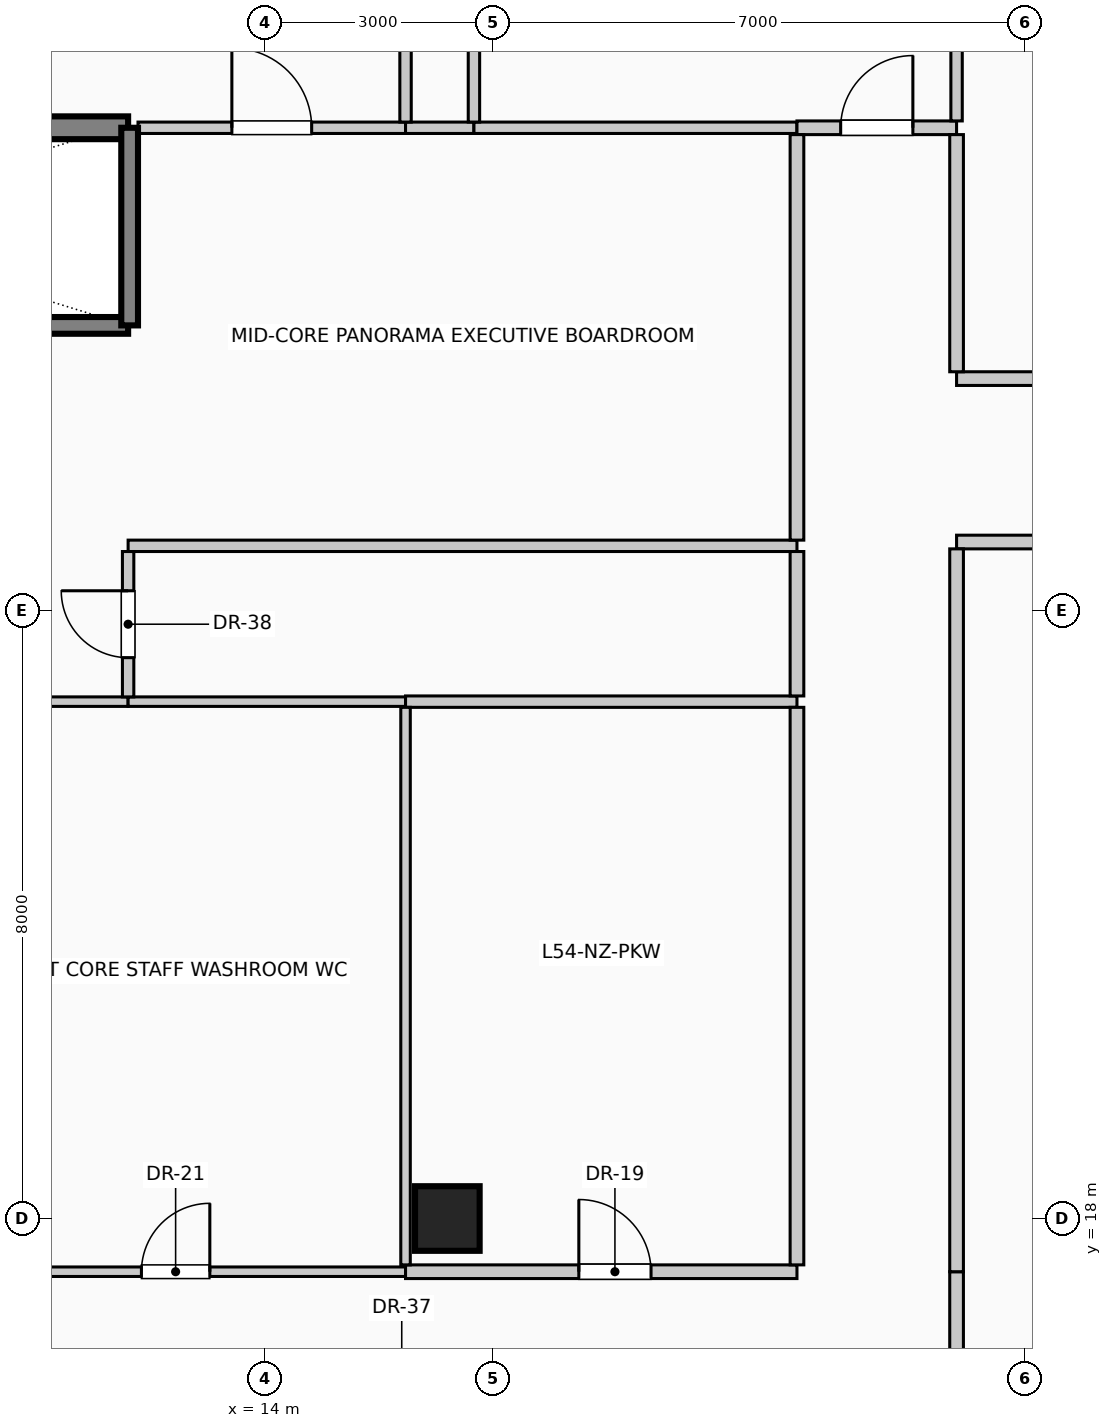
"""IFC4 building model, lengths in metres.
Left out: names, types, materials, properties, quantities, classifications, styles, units other than length and angle.
Written with IfcOpenShell. Run it as: python <this file> out.ifc"""

import sys

from ifc_helpers import new_model, si_unit, direction, frame, frame_2d, origin, origin_2d, place, context, subcontext, project, spatial, rectangle, circle, extrude, element, fill, save


model = new_model("IFC4")
c1 = context("Model", 3, precision=1e-05, world=origin(), true_north=direction((0.0, 1.0)))
c2 = subcontext(c1, "Body", "Model", "MODEL_VIEW")
j1 = project(units=[si_unit("LENGTHUNIT", "METRE"), si_unit("PLANEANGLEUNIT", "RADIAN")], contexts=[c1])
p1 = place(None, origin())
s1 = spatial("IfcSite", under=j1, at=p1, CompositionType="ELEMENT")
p2 = place(p1, origin())
s2 = spatial("IfcBuilding", under=s1, at=p2, CompositionType="ELEMENT")
p3 = place(p2, frame((0.0, 0.0, 222.6)))
s3 = spatial("IfcBuildingStorey", under=s2, at=p3, CompositionType="ELEMENT", Elevation=222.6)
p4 = place(p3, frame((16.4, 18.0, 0.0), z_axis=(0.0, 0.0, 1.0), x_axis=(1.0, 0.0, 0.0)))
e1 = element("IfcColumn", 1, at=p4, inside=s3, PredefinedType="COLUMN", context=c2, shape_type="SweptSolid", body=[
    extrude(circle(Radius=0.425, at=origin_2d()), origin(), (0.0, 0.0, 1.0), 4.0),
])
p5 = place(p3, frame((10.05, 32.35, 0.0), z_axis=(0.0, 0.0, 1.0), x_axis=(1.0, 0.0, 0.0)))
e2 = element("IfcWall", 2, at=p5, inside=s3, PredefinedType="SOLIDWALL", context=c2, shape_type="SweptSolid", body=[
    extrude(rectangle(XDim=2.15, YDim=0.3, at=frame_2d((1.075, 0.0))), origin(), (0.0, 0.0, 1.0), 4.0),
])
p6 = place(p3, frame((3.55, 29.75, 0.0), z_axis=(0.0, 0.0, 1.0), x_axis=(1.0, 0.0, 0.0)))
e3 = element("IfcWall", 3, at=p6, inside=s3, PredefinedType="SOLIDWALL", context=c2, shape_type="SweptSolid", body=[
    extrude(rectangle(XDim=8.65, YDim=0.22, at=frame_2d((4.325, 0.0))), origin(), (0.0, 0.0, 1.0), 4.0),
])
p7 = place(p3, frame((12.22, 29.75, 0.0), z_axis=(0.0, 0.0, 1.0), x_axis=(0.0, 1.0, 0.0)))
e4 = element("IfcWall", 4, at=p7, inside=s3, PredefinedType="SOLIDWALL", context=c2, shape_type="SweptSolid", body=[
    extrude(rectangle(XDim=2.6, YDim=0.22, at=frame_2d((1.3, 0.0))), origin(), (0.0, 0.0, 1.0), 4.0),
])
p8 = place(p3, frame((9.8, 17.3, 0.0), z_axis=(0.0, 0.0, 1.0), x_axis=(1.0, 0.0, 0.0)))
e5 = element("IfcWall", 5, at=p8, inside=s3, PredefinedType="PARTITIONING", context=c2, shape_type="SweptSolid", body=[
    extrude(rectangle(XDim=6.05, YDim=0.125, at=frame_2d((3.025, 0.0))), origin(), (0.0, 0.0, 1.0), 3.75),
])
p9 = place(p8, frame((2.575, 0.0, 0.0)))
e6 = element("IfcOpeningElement", 6, at=p9, cuts=e5, PredefinedType="OPENING", context=c2, shape_type="SweptSolid", body=[
    extrude(rectangle(XDim=0.9, YDim=2.1, at=frame_2d((0.45, 1.05))), frame((0.0, 0.073, 0.0), z_axis=(0.0, -1.0, 0.0), x_axis=(1.0, 0.0, 0.0)), (0.0, 0.0, 1.0), 0.145),
])
p10 = place(p3, frame((15.85, 17.3, 0.0), z_axis=(0.0, 0.0, 1.0), x_axis=(1.0, 0.0, 0.0)))
e7 = element("IfcWall", 7, at=p10, inside=s3, PredefinedType="PARTITIONING", context=c2, shape_type="SweptSolid", body=[
    extrude(rectangle(XDim=5.15, YDim=0.18, at=frame_2d((2.575, 0.0))), origin(), (0.0, 0.0, 1.0), 3.75),
])
p11 = place(p10, frame((2.28, 0.0, 0.0)))
e8 = element("IfcOpeningElement", 8, at=p11, cuts=e7, PredefinedType="OPENING", context=c2, shape_type="SweptSolid", body=[
    extrude(rectangle(XDim=0.95, YDim=2.15, at=frame_2d((0.475, 1.075))), frame((0.0, 0.1, 0.0), z_axis=(0.0, -1.0, 0.0), x_axis=(1.0, 0.0, 0.0)), (0.0, 0.0, 1.0), 0.2),
])
p12 = place(p3, frame((9.8, 24.8, 0.0), z_axis=(0.0, 0.0, 1.0), x_axis=(1.0, 0.0, 0.0)))
e9 = element("IfcWall", 9, at=p12, inside=s3, PredefinedType="PARTITIONING", context=c2, shape_type="SweptSolid", body=[
    extrude(rectangle(XDim=2.4, YDim=0.125, at=frame_2d((1.2, 0.0))), origin(), (0.0, 0.0, 1.0), 3.75),
])
p13 = place(p3, frame((12.2, 24.8, 0.0), z_axis=(0.0, 0.0, 1.0), x_axis=(1.0, 0.0, 0.0)))
e10 = element("IfcWall", 10, at=p13, inside=s3, PredefinedType="PARTITIONING", context=c2, shape_type="SweptSolid", body=[
    extrude(rectangle(XDim=3.65, YDim=0.125, at=frame_2d((1.825, 0.0))), origin(), (0.0, 0.0, 1.0), 3.75),
])
p14 = place(p3, frame((15.85, 24.8, 0.0), z_axis=(0.0, 0.0, 1.0), x_axis=(1.0, 0.0, 0.0)))
e11 = element("IfcWall", 11, at=p14, inside=s3, PredefinedType="PARTITIONING", context=c2, shape_type="SweptSolid", body=[
    extrude(rectangle(XDim=5.15, YDim=0.15, at=frame_2d((2.575, 0.0))), origin(), (0.0, 0.0, 1.0), 3.75),
])
p15 = place(p3, frame((12.2, 26.85, 0.0), z_axis=(0.0, 0.0, 1.0), x_axis=(1.0, 0.0, 0.0)))
e12 = element("IfcWall", 12, at=p15, inside=s3, PredefinedType="PARTITIONING", context=c2, shape_type="SweptSolid", body=[
    extrude(rectangle(XDim=8.8, YDim=0.15, at=frame_2d((4.4, 0.0))), origin(), (0.0, 0.0, 1.0), 3.75),
])
p16 = place(p3, frame((23.1, 26.9, 0.0), z_axis=(0.0, 0.0, 1.0), x_axis=(1.0, 0.0, 0.0)))
e13 = element("IfcWall", 13, at=p16, inside=s3, PredefinedType="PARTITIONING", context=c2, shape_type="SweptSolid", body=[
    extrude(rectangle(XDim=9.1, YDim=0.18, at=frame_2d((4.55, 0.0))), origin(), (0.0, 0.0, 1.0), 3.75),
])
p17 = place(p16, frame((4.075, 0.0, 0.0)))
e14 = element("IfcOpeningElement", 14, at=p17, cuts=e13, PredefinedType="OPENING", context=c2, shape_type="SweptSolid", body=[
    extrude(rectangle(XDim=0.95, YDim=2.15, at=frame_2d((0.475, 1.075))), frame((0.0, 0.1, 0.0), z_axis=(0.0, -1.0, 0.0), x_axis=(1.0, 0.0, 0.0)), (0.0, 0.0, 1.0), 0.2),
])
p18 = place(p3, frame((23.1, 29.05, 0.0), z_axis=(0.0, 0.0, 1.0), x_axis=(1.0, 0.0, 0.0)))
e15 = element("IfcWall", 15, at=p18, inside=s3, PredefinedType="PARTITIONING", context=c2, shape_type="SweptSolid", body=[
    extrude(rectangle(XDim=3.66, YDim=0.18, at=frame_2d((1.83, 0.0))), origin(), (0.0, 0.0, 1.0), 3.75),
])
p19 = place(p18, frame((1.355, 0.0, 0.0)))
e16 = element("IfcOpeningElement", 16, at=p19, cuts=e15, PredefinedType="OPENING", context=c2, shape_type="SweptSolid", body=[
    extrude(rectangle(XDim=0.95, YDim=2.15, at=frame_2d((0.475, 1.075))), frame((0.0, 0.1, 0.0), z_axis=(0.0, -1.0, 0.0), x_axis=(1.0, 0.0, 0.0)), (0.0, 0.0, 1.0), 0.2),
])
p20 = place(p3, frame((12.33, 32.35, 0.0), z_axis=(0.0, 0.0, 1.0), x_axis=(1.0, 0.0, 0.0)))
e17 = element("IfcWall", 17, at=p20, inside=s3, PredefinedType="PARTITIONING", context=c2, shape_type="SweptSolid", body=[
    extrude(rectangle(XDim=3.52, YDim=0.15, at=frame_2d((1.76, 0.0))), origin(), (0.0, 0.0, 1.0), 3.75),
])
p21 = place(p20, frame((1.235, 0.0, 0.0)))
e18 = element("IfcOpeningElement", 18, at=p21, cuts=e17, PredefinedType="OPENING", context=c2, shape_type="SweptSolid", body=[
    extrude(rectangle(XDim=1.05, YDim=2.15, at=frame_2d((0.525, 1.075))), frame((0.0, 0.085, 0.0), z_axis=(0.0, -1.0, 0.0), x_axis=(1.0, 0.0, 0.0)), (0.0, 0.0, 1.0), 0.17),
])
p22 = place(p3, frame((15.85, 32.35, 0.0), z_axis=(0.0, 0.0, 1.0), x_axis=(1.0, 0.0, 0.0)))
e19 = element("IfcWall", 19, at=p22, inside=s3, PredefinedType="PARTITIONING", context=c2, shape_type="SweptSolid", body=[
    extrude(rectangle(XDim=0.9, YDim=0.15, at=frame_2d((0.45, 0.0))), origin(), (0.0, 0.0, 1.0), 3.75),
])
p23 = place(p3, frame((16.75, 32.35, 0.0), z_axis=(0.0, 0.0, 1.0), x_axis=(1.0, 0.0, 0.0)))
e20 = element("IfcWall", 20, at=p23, inside=s3, PredefinedType="PARTITIONING", context=c2, shape_type="SweptSolid", body=[
    extrude(rectangle(XDim=4.25, YDim=0.15, at=frame_2d((2.125, 0.0))), origin(), (0.0, 0.0, 1.0), 3.75),
])
p24 = place(p3, frame((21.0, 32.35, 0.0), z_axis=(0.0, 0.0, 1.0), x_axis=(1.0, 0.0, 0.0)))
e21 = element("IfcWall", 21, at=p24, inside=s3, PredefinedType="PARTITIONING", context=c2, shape_type="SweptSolid", body=[
    extrude(rectangle(XDim=2.1, YDim=0.18, at=frame_2d((1.05, 0.0))), origin(), (0.0, 0.0, 1.0), 3.75),
])
p25 = place(p24, frame((0.575, 0.0, 0.0)))
e22 = element("IfcOpeningElement", 22, at=p25, cuts=e21, PredefinedType="OPENING", context=c2, shape_type="SweptSolid", body=[
    extrude(rectangle(XDim=0.95, YDim=2.15, at=frame_2d((0.475, 1.075))), frame((0.0, 0.1, 0.0), z_axis=(0.0, -1.0, 0.0), x_axis=(1.0, 0.0, 0.0)), (0.0, 0.0, 1.0), 0.2),
])
p26 = place(p3, frame((12.2, 24.863, 0.0), z_axis=(0.0, 0.0, 1.0), x_axis=(0.0, 1.0, 0.0)))
e23 = element("IfcWall", 23, at=p26, inside=s3, PredefinedType="PARTITIONING", context=c2, shape_type="SweptSolid", body=[
    extrude(rectangle(XDim=1.912, YDim=0.15, at=frame_2d((0.956, 0.0))), origin(), (0.0, 0.0, 1.0), 3.75),
])
p27 = place(p26, frame((0.516, 0.0, 0.0)))
e24 = element("IfcOpeningElement", 24, at=p27, cuts=e23, PredefinedType="OPENING", context=c2, shape_type="SweptSolid", body=[
    extrude(rectangle(XDim=0.88, YDim=2.1, at=frame_2d((0.44, 1.05))), frame((0.0, 0.085, 0.0), z_axis=(0.0, -1.0, 0.0), x_axis=(1.0, 0.0, 0.0)), (0.0, 0.0, 1.0), 0.17),
])
p28 = place(p3, frame((15.85, 17.39, 0.0), z_axis=(0.0, 0.0, 1.0), x_axis=(0.0, 1.0, 0.0)))
e25 = element("IfcWall", 25, at=p28, inside=s3, PredefinedType="PARTITIONING", context=c2, shape_type="SweptSolid", body=[
    extrude(rectangle(XDim=7.335, YDim=0.125, at=frame_2d((3.667, 0.0))), origin(), (0.0, 0.0, 1.0), 3.75),
])
p29 = place(p3, frame((15.85, 32.425, 0.0), z_axis=(0.0, 0.0, 1.0), x_axis=(0.0, 1.0, 0.0)))
e26 = element("IfcWall", 26, at=p29, inside=s3, PredefinedType="PARTITIONING", context=c2, shape_type="SweptSolid", body=[
    extrude(rectangle(XDim=1.725, YDim=0.15, at=frame_2d((0.862, 0.0))), origin(), (0.0, 0.0, 1.0), 3.75),
])
p30 = place(p3, frame((16.75, 32.425, 0.0), z_axis=(0.0, 0.0, 1.0), x_axis=(0.0, 1.0, 0.0)))
e27 = element("IfcWall", 27, at=p30, inside=s3, PredefinedType="PARTITIONING", context=c2, shape_type="SweptSolid", body=[
    extrude(rectangle(XDim=1.15, YDim=0.15, at=frame_2d((0.575, 0.0))), origin(), (0.0, 0.0, 1.0), 3.75),
])
p31 = place(p3, frame((21.0, 17.39, 0.0), z_axis=(0.0, 0.0, 1.0), x_axis=(0.0, 1.0, 0.0)))
e28 = element("IfcWall", 28, at=p31, inside=s3, PredefinedType="PARTITIONING", context=c2, shape_type="SweptSolid", body=[
    extrude(rectangle(XDim=7.335, YDim=0.18, at=frame_2d((3.667, 0.0))), origin(), (0.0, 0.0, 1.0), 3.75),
])
p32 = place(p3, frame((21.0, 24.875, 0.0), z_axis=(0.0, 0.0, 1.0), x_axis=(0.0, 1.0, 0.0)))
e29 = element("IfcWall", 29, at=p32, inside=s3, PredefinedType="PARTITIONING", context=c2, shape_type="SweptSolid", body=[
    extrude(rectangle(XDim=1.9, YDim=0.18, at=frame_2d((0.95, 0.0))), origin(), (0.0, 0.0, 1.0), 3.75),
])
p33 = place(p3, frame((21.0, 26.925, 0.0), z_axis=(0.0, 0.0, 1.0), x_axis=(0.0, 1.0, 0.0)))
e30 = element("IfcWall", 30, at=p33, inside=s3, PredefinedType="PARTITIONING", context=c2, shape_type="SweptSolid", body=[
    extrude(rectangle(XDim=5.335, YDim=0.18, at=frame_2d((2.667, 0.0))), origin(), (0.0, 0.0, 1.0), 3.75),
])
p34 = place(p3, frame((23.1, 15.29, 0.0), z_axis=(0.0, 0.0, 1.0), x_axis=(0.0, 1.0, 0.0)))
e31 = element("IfcWall", 31, at=p34, inside=s3, PredefinedType="PARTITIONING", context=c2, shape_type="SweptSolid", body=[
    extrude(rectangle(XDim=2.01, YDim=0.18, at=frame_2d((1.005, 0.0))), origin(), (0.0, 0.0, 1.0), 3.75),
])
p35 = place(p3, frame((23.1, 17.3, 0.0), z_axis=(0.0, 0.0, 1.0), x_axis=(0.0, 1.0, 0.0)))
e32 = element("IfcWall", 32, at=p35, inside=s3, PredefinedType="PARTITIONING", context=c2, shape_type="SweptSolid", body=[
    extrude(rectangle(XDim=9.51, YDim=0.18, at=frame_2d((4.755, 0.0))), origin(), (0.0, 0.0, 1.0), 3.75),
])
p36 = place(p3, frame((23.1, 29.14, 0.0), z_axis=(0.0, 0.0, 1.0), x_axis=(0.0, 1.0, 0.0)))
e33 = element("IfcWall", 33, at=p36, inside=s3, PredefinedType="PARTITIONING", context=c2, shape_type="SweptSolid", body=[
    extrude(rectangle(XDim=3.12, YDim=0.18, at=frame_2d((1.56, 0.0))), origin(), (0.0, 0.0, 1.0), 3.75),
])
p37 = place(p3, frame((23.1, 32.44, 0.0), z_axis=(0.0, 0.0, 1.0), x_axis=(0.0, 1.0, 0.0)))
e34 = element("IfcWall", 34, at=p37, inside=s3, PredefinedType="PARTITIONING", context=c2, shape_type="SweptSolid", body=[
    extrude(rectangle(XDim=12.84, YDim=0.15, at=frame_2d((6.42, 0.0))), origin(), (0.0, 0.0, 1.0), 3.75),
])
p38 = place(p9, origin())
e35 = element("IfcDoor", 35, at=p38, inside=s3, OperationType="SINGLE_SWING_RIGHT", PredefinedType="DOOR", context=c2, shape_type="SweptSolid", body=[
    extrude(rectangle(XDim=0.9, YDim=2.1, at=frame_2d((0.45, 1.05))), frame((0.0, 0.025, 0.0), z_axis=(0.0, -1.0, 0.0), x_axis=(1.0, 0.0, 0.0)), (0.0, 0.0, 1.0), 0.05),
])
fill(e6, e35)
p39 = place(p11, origin())
e36 = element("IfcDoor", 36, at=p39, inside=s3, OperationType="SINGLE_SWING_LEFT", PredefinedType="DOOR", context=c2, shape_type="SweptSolid", body=[
    extrude(rectangle(XDim=0.95, YDim=2.15, at=frame_2d((0.475, 1.075))), frame((0.0, 0.025, 0.0), z_axis=(0.0, -1.0, 0.0), x_axis=(1.0, 0.0, 0.0)), (0.0, 0.0, 1.0), 0.05),
])
fill(e8, e36)
p40 = place(p21, origin())
e37 = element("IfcDoor", 37, at=p40, inside=s3, OperationType="SINGLE_SWING_LEFT", PredefinedType="DOOR", context=c2, shape_type="SweptSolid", body=[
    extrude(rectangle(XDim=1.05, YDim=2.15, at=frame_2d((0.525, 1.075))), frame((0.0, 0.025, 0.0), z_axis=(0.0, -1.0, 0.0), x_axis=(1.0, 0.0, 0.0)), (0.0, 0.0, 1.0), 0.05),
])
fill(e18, e37)
p41 = place(p25, origin())
e38 = element("IfcDoor", 38, at=p41, inside=s3, OperationType="SINGLE_SWING_RIGHT", PredefinedType="DOOR", context=c2, shape_type="SweptSolid", body=[
    extrude(rectangle(XDim=0.95, YDim=2.15, at=frame_2d((0.475, 1.075))), frame((0.0, 0.025, 0.0), z_axis=(0.0, -1.0, 0.0), x_axis=(1.0, 0.0, 0.0)), (0.0, 0.0, 1.0), 0.05),
])
fill(e22, e38)
p42 = place(p27, origin())
e39 = element("IfcDoor", 39, at=p42, inside=s3, OperationType="SINGLE_SWING_RIGHT", PredefinedType="DOOR", context=c2, shape_type="SweptSolid", body=[
    extrude(rectangle(XDim=0.88, YDim=2.1, at=frame_2d((0.44, 1.05))), frame((0.0, 0.025, 0.0), z_axis=(0.0, -1.0, 0.0), x_axis=(1.0, 0.0, 0.0)), (0.0, 0.0, 1.0), 0.05),
])
fill(e24, e39)
save(model, sys.argv[1])
